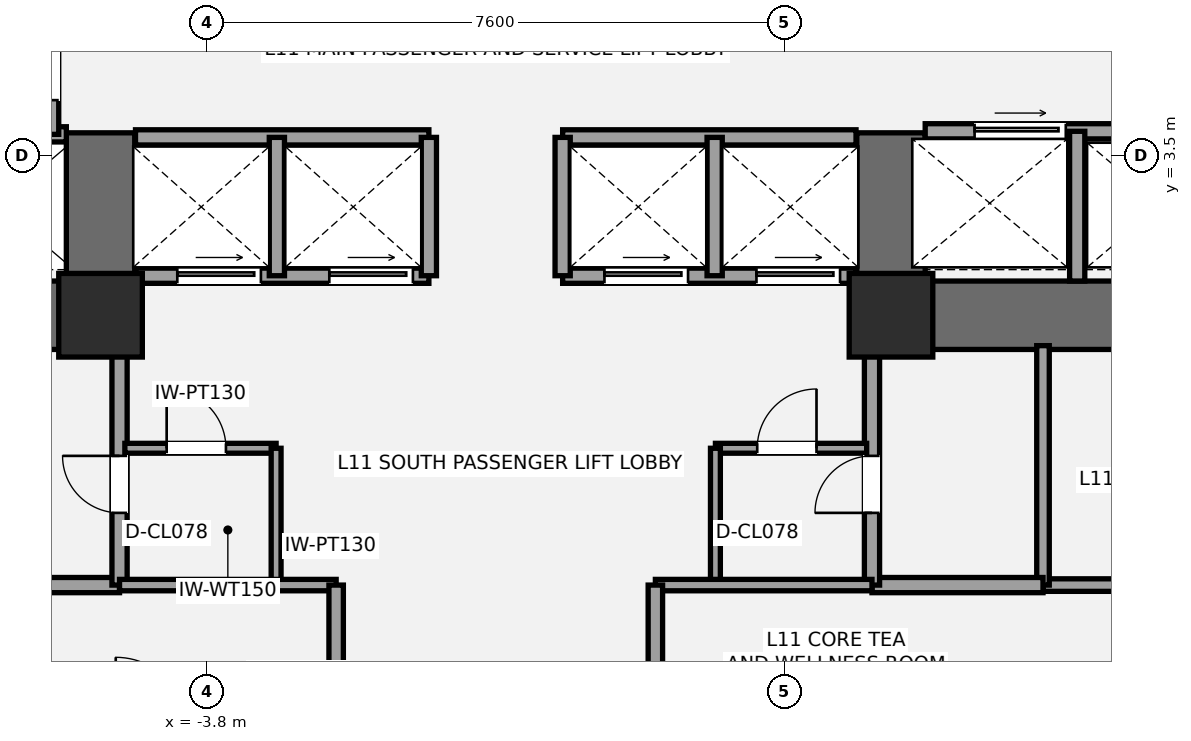
"""IFC4 building model, lengths in metres.
Left out: names, types, materials, properties, quantities, classifications, styles, units other than length and angle.
Written with IfcOpenShell. Run it as: python <this file> out.ifc"""

import sys

from ifc_helpers import new_model, si_unit, direction, frame, frame_2d, origin, origin_2d, place, context, subcontext, project, spatial, rectangle, extrude, element, fill, save


model = new_model("IFC4")
c1 = context("Model", 3, precision=1e-05, world=origin(), true_north=direction((0.0, 1.0)))
c2 = subcontext(c1, "Body", "Model", "MODEL_VIEW")
j1 = project(units=[si_unit("LENGTHUNIT", "METRE"), si_unit("PLANEANGLEUNIT", "RADIAN")], contexts=[c1])
p1 = place(None, origin())
s1 = spatial("IfcSite", under=j1, at=p1, CompositionType="ELEMENT")
p2 = place(p1, origin())
s2 = spatial("IfcBuilding", under=s1, at=p2, CompositionType="ELEMENT")
p3 = place(p2, frame((0.0, 0.0, 45.0)))
s3 = spatial("IfcBuildingStorey", under=s2, at=p3, CompositionType="ELEMENT", Elevation=45.0)
p4 = place(p3, frame((-4.75, 1.4, 0.0), z_axis=(0.0, 0.0, 1.0), x_axis=(-1.0, 0.0, 0.0)))
e1 = element("IfcWall", 1, at=p4, inside=s3, PredefinedType="SHEAR", context=c2, shape_type="SweptSolid", body=[
    extrude(rectangle(XDim=9.3, YDim=0.9, at=frame_2d((4.65, 0.0))), origin(), (0.0, 0.0, 1.0), 3.6),
])
p5 = place(p4, frame((5.55, 0.0, 0.0)))
e2 = element("IfcOpeningElement", 2, at=p5, cuts=e1, PredefinedType="OPENING", context=c2, shape_type="SweptSolid", body=[
    extrude(rectangle(XDim=1.05, YDim=2.15, at=frame_2d((0.525, 1.075))), frame((0.0, 0.46, 0.0), z_axis=(0.0, -1.0, 0.0), x_axis=(1.0, 0.0, 0.0)), (0.0, 0.0, 1.0), 0.92),
])
p6 = place(p4, frame((3.88, 0.0, 0.0)))
e3 = element("IfcOpeningElement", 3, at=p6, cuts=e1, PredefinedType="OPENING", context=c2, shape_type="SweptSolid", body=[
    extrude(rectangle(XDim=1.1, YDim=2.2, at=frame_2d((0.55, 1.1))), frame((0.0, 0.46, 0.0), z_axis=(0.0, -1.0, 0.0), x_axis=(1.0, 0.0, 0.0)), (0.0, 0.0, 1.0), 0.92),
])
p7 = place(p3, frame((-5.2, 0.95, 0.0), z_axis=(0.0, 0.0, 1.0), x_axis=(0.0, 1.0, 0.0)))
e4 = element("IfcWall", 4, at=p7, inside=s3, PredefinedType="SHEAR", context=c2, shape_type="SweptSolid", body=[
    extrude(rectangle(XDim=2.85, YDim=0.9, at=frame_2d((1.425, 0.0))), origin(), (0.0, 0.0, 1.0), 3.6),
])
p8 = place(p3, frame((14.05, 1.4, 0.0), z_axis=(0.0, 0.0, 1.0), x_axis=(-1.0, 0.0, 0.0)))
e5 = element("IfcWall", 5, at=p8, inside=s3, PredefinedType="SHEAR", context=c2, shape_type="SweptSolid", body=[
    extrude(rectangle(XDim=9.3, YDim=0.9, at=frame_2d((4.65, 0.0))), origin(), (0.0, 0.0, 1.0), 3.6),
])
p9 = place(p8, frame((2.7, 0.0, 0.0)))
e6 = element("IfcOpeningElement", 6, at=p9, cuts=e5, PredefinedType="OPENING", context=c2, shape_type="SweptSolid", body=[
    extrude(rectangle(XDim=1.05, YDim=2.15, at=frame_2d((0.525, 1.075))), frame((0.0, 0.46, 0.0), z_axis=(0.0, -1.0, 0.0), x_axis=(1.0, 0.0, 0.0)), (0.0, 0.0, 1.0), 0.92),
])
p10 = place(p8, frame((4.7, 0.0, 0.0)))
e7 = element("IfcOpeningElement", 7, at=p10, cuts=e5, PredefinedType="OPENING", context=c2, shape_type="SweptSolid", body=[
    extrude(rectangle(XDim=1.1, YDim=2.2, at=frame_2d((0.55, 1.1))), frame((0.0, 0.46, 0.0), z_axis=(0.0, -1.0, 0.0), x_axis=(1.0, 0.0, 0.0)), (0.0, 0.0, 1.0), 0.92),
])
p11 = place(p3, frame((5.2, 0.95, 0.0), z_axis=(0.0, 0.0, 1.0), x_axis=(0.0, 1.0, 0.0)))
e8 = element("IfcWall", 8, at=p11, inside=s3, PredefinedType="SHEAR", context=c2, shape_type="SweptSolid", body=[
    extrude(rectangle(XDim=2.85, YDim=0.9, at=frame_2d((1.425, 0.0))), origin(), (0.0, 0.0, 1.0), 3.6),
])
for number, where, z_axis, x_axis in (
    (9, (-5.2, 1.4, 0.0), (0.0, 0.0, 1.0), (1.0, 0.0, 0.0)),
    (10, (5.2, 1.4, 0.0), (0.0, 0.0, 1.0), (1.0, 0.0, 0.0)),
):
    element("IfcColumn", number, at=place(p3, frame(where, z_axis=z_axis, x_axis=x_axis)), inside=s3, PredefinedType="COLUMN", context=c2, shape_type="SweptSolid", body=[
        extrude(rectangle(XDim=1.1, YDim=1.1, at=origin_2d()), origin(), (0.0, 0.0, 1.0), 3.6),
    ])
p12 = place(p3, frame((-7.2, -2.15, 0.0), z_axis=(0.0, 0.0, 1.0), x_axis=(1.0, 0.0, 0.0)))
e11 = element("IfcWall", 11, at=p12, inside=s3, PredefinedType="SOLIDWALL", context=c2, shape_type="SweptSolid", body=[
    extrude(rectangle(XDim=2.25, YDim=0.2, at=frame_2d((1.125, 0.0))), origin(), (0.0, 0.0, 1.0), 3.4),
])
p13 = place(p3, frame((-4.95, -2.15, 0.0), z_axis=(0.0, 0.0, 1.0), x_axis=(0.0, 1.0, 0.0)))
e12 = element("IfcWall", 12, at=p13, inside=s3, PredefinedType="SOLIDWALL", context=c2, shape_type="SweptSolid", body=[
    extrude(rectangle(XDim=3.15, YDim=0.2, at=frame_2d((1.575, 0.0))), origin(), (0.0, 0.0, 1.0), 2.853),
])
p14 = place(p13, frame((0.95, 0.0, 0.0)))
e13 = element("IfcOpeningElement", 13, at=p14, cuts=e12, PredefinedType="OPENING", context=c2, shape_type="SweptSolid", body=[
    extrude(rectangle(XDim=0.75, YDim=2.1, at=frame_2d((0.375, 1.05))), frame((0.0, 0.11, 0.0), z_axis=(0.0, -1.0, 0.0), x_axis=(1.0, 0.0, 0.0)), (0.0, 0.0, 1.0), 0.22),
])
p15 = place(p3, frame((7.2, -2.15, 0.0), z_axis=(0.0, 0.0, 1.0), x_axis=(1.0, 0.0, 0.0)))
e14 = element("IfcWall", 14, at=p15, inside=s3, PredefinedType="PARTITIONING", context=c2, shape_type="SweptSolid", body=[
    extrude(rectangle(XDim=6.25, YDim=0.165, at=frame_2d((3.125, 0.0))), origin(), (0.0, 0.0, 1.0), 3.4),
])
p16 = place(p3, frame((7.2, -2.15, 0.0), z_axis=(0.0, 0.0, 1.0), x_axis=(0.0, 1.0, 0.0)))
e15 = element("IfcWall", 15, at=p16, inside=s3, PredefinedType="PARTITIONING", context=c2, shape_type="SweptSolid", body=[
    extrude(rectangle(XDim=3.15, YDim=0.165, at=frame_2d((1.575, 0.0))), origin(), (0.0, 0.0, 1.0), 2.853),
])
p17 = place(p3, frame((4.95, -2.15, 0.0), z_axis=(0.0, 0.0, 1.0), x_axis=(1.0, 0.0, 0.0)))
e16 = element("IfcWall", 16, at=p17, inside=s3, PredefinedType="SOLIDWALL", context=c2, shape_type="SweptSolid", body=[
    extrude(rectangle(XDim=2.25, YDim=0.2, at=frame_2d((1.125, 0.0))), origin(), (0.0, 0.0, 1.0), 3.4),
])
p18 = place(p3, frame((4.95, -2.15, 0.0), z_axis=(0.0, 0.0, 1.0), x_axis=(0.0, 1.0, 0.0)))
e17 = element("IfcWall", 17, at=p18, inside=s3, PredefinedType="SOLIDWALL", context=c2, shape_type="SweptSolid", body=[
    extrude(rectangle(XDim=3.15, YDim=0.2, at=frame_2d((1.575, 0.0))), origin(), (0.0, 0.0, 1.0), 3.4),
])
p19 = place(p18, frame((0.95, 0.0, 0.0)))
e18 = element("IfcOpeningElement", 18, at=p19, cuts=e17, PredefinedType="OPENING", context=c2, shape_type="SweptSolid", body=[
    extrude(rectangle(XDim=0.75, YDim=2.1, at=frame_2d((0.375, 1.05))), frame((0.0, 0.11, 0.0), z_axis=(0.0, -1.0, 0.0), x_axis=(1.0, 0.0, 0.0)), (0.0, 0.0, 1.0), 0.22),
])
p20 = place(p3, frame((-4.88, -0.35, 0.0), z_axis=(0.0, 0.0, 1.0), x_axis=(1.0, 0.0, 0.0)))
e19 = element("IfcWall", 19, at=p20, inside=s3, PredefinedType="PARTITIONING", context=c2, shape_type="SweptSolid", body=[
    extrude(rectangle(XDim=1.99, YDim=0.13, at=frame_2d((0.995, 0.0))), origin(), (0.0, 0.0, 1.0), 3.4),
])
p21 = place(p20, frame((0.55, 0.0, 0.0)))
e20 = element("IfcOpeningElement", 20, at=p21, cuts=e19, PredefinedType="OPENING", context=c2, shape_type="SweptSolid", body=[
    extrude(rectangle(XDim=0.78, YDim=2.1, at=frame_2d((0.39, 1.05))), frame((0.0, 0.075, 0.0), z_axis=(0.0, -1.0, 0.0), x_axis=(1.0, 0.0, 0.0)), (0.0, 0.0, 1.0), 0.15),
])
p22 = place(p3, frame((-2.89, -2.15, 0.0), z_axis=(0.0, 0.0, 1.0), x_axis=(0.0, 1.0, 0.0)))
e21 = element("IfcWall", 21, at=p22, inside=s3, PredefinedType="PARTITIONING", context=c2, shape_type="SweptSolid", body=[
    extrude(rectangle(XDim=1.8, YDim=0.13, at=frame_2d((0.9, 0.0))), origin(), (0.0, 0.0, 1.0), 3.4),
])
p23 = place(p3, frame((2.89, -0.35, 0.0), z_axis=(0.0, 0.0, 1.0), x_axis=(1.0, 0.0, 0.0)))
e22 = element("IfcWall", 22, at=p23, inside=s3, PredefinedType="PARTITIONING", context=c2, shape_type="SweptSolid", body=[
    extrude(rectangle(XDim=1.99, YDim=0.13, at=frame_2d((0.995, 0.0))), origin(), (0.0, 0.0, 1.0), 3.4),
])
p24 = place(p23, frame((0.55, 0.0, 0.0)))
e23 = element("IfcOpeningElement", 23, at=p24, cuts=e22, PredefinedType="OPENING", context=c2, shape_type="SweptSolid", body=[
    extrude(rectangle(XDim=0.78, YDim=2.1, at=frame_2d((0.39, 1.05))), frame((0.0, 0.075, 0.0), z_axis=(0.0, -1.0, 0.0), x_axis=(1.0, 0.0, 0.0)), (0.0, 0.0, 1.0), 0.15),
])
p25 = place(p3, frame((2.89, -2.15, 0.0), z_axis=(0.0, 0.0, 1.0), x_axis=(0.0, 1.0, 0.0)))
e24 = element("IfcWall", 24, at=p25, inside=s3, PredefinedType="PARTITIONING", context=c2, shape_type="SweptSolid", body=[
    extrude(rectangle(XDim=1.8, YDim=0.13, at=frame_2d((0.9, 0.0))), origin(), (0.0, 0.0, 1.0), 3.4),
])
p26 = place(p3, frame((-9.78, 3.78, 0.0), z_axis=(0.0, 0.0, 1.0), x_axis=(1.0, 0.0, 0.0)))
e25 = element("IfcWall", 25, at=p26, inside=s3, PredefinedType="SOLIDWALL", context=c2, shape_type="SweptSolid", body=[
    extrude(rectangle(XDim=4.13, YDim=0.2, at=frame_2d((2.065, 0.0))), origin(), (0.0, 0.0, 1.0), 3.4),
])
p27 = place(p3, frame((-5.85, 3.78, 0.0), z_axis=(0.0, 0.0, 1.0), x_axis=(0.0, 1.0, 0.0)))
e26 = element("IfcWall", 26, at=p27, inside=s3, PredefinedType="SOLIDWALL", context=c2, shape_type="SweptSolid", body=[
    extrude(rectangle(XDim=1.69, YDim=0.2, at=frame_2d((0.845, 0.0))), origin(), (0.0, 0.0, 1.0), 3.4),
])
p28 = place(p27, frame((0.45, 0.0, 0.0)))
e27 = element("IfcOpeningElement", 27, at=p28, cuts=e26, PredefinedType="OPENING", context=c2, shape_type="SweptSolid", body=[
    extrude(rectangle(XDim=0.75, YDim=2.1, at=frame_2d((0.375, 1.05))), frame((0.0, 0.11, 0.0), z_axis=(0.0, -1.0, 0.0), x_axis=(1.0, 0.0, 0.0)), (0.0, 0.0, 1.0), 0.22),
])
p29 = place(p3, frame((5.65, 3.82, 0.0), z_axis=(0.0, 0.0, 1.0), x_axis=(1.0, 0.0, 0.0)))
e28 = element("IfcWall", 28, at=p29, inside=s3, PredefinedType="SOLIDWALL", context=c2, shape_type="SweptSolid", body=[
    extrude(rectangle(XDim=4.13, YDim=0.2, at=frame_2d((2.065, 0.0))), origin(), (0.0, 0.0, 1.0), 3.4),
])
p30 = place(p29, frame((0.65, 0.0, 0.0)))
e29 = element("IfcOpeningElement", 29, at=p30, cuts=e28, PredefinedType="OPENING", context=c2, shape_type="SweptSolid", body=[
    extrude(rectangle(XDim=1.2, YDim=2.2, at=frame_2d((0.6, 1.1))), frame((0.0, 0.11, 0.0), z_axis=(0.0, -1.0, 0.0), x_axis=(1.0, 0.0, 0.0)), (0.0, 0.0, 1.0), 0.22),
])
p31 = place(p3, frame((7.65, 1.85, 0.0), z_axis=(0.0, 0.0, 1.0), x_axis=(0.0, 1.0, 0.0)))
e30 = element("IfcWall", 30, at=p31, inside=s3, PredefinedType="SOLIDWALL", context=c2, shape_type="SweptSolid", body=[
    extrude(rectangle(XDim=1.97, YDim=0.2, at=frame_2d((0.985, 0.0))), origin(), (0.0, 0.0, 1.0), 3.4),
])
p32 = place(p3, frame((-4.74, 1.92, 0.0), z_axis=(0.0, 0.0, 1.0), x_axis=(1.0, 0.0, 0.0)))
e31 = element("IfcWall", 31, at=p32, inside=s3, PredefinedType="SOLIDWALL", context=c2, shape_type="SweptSolid", body=[
    extrude(rectangle(XDim=3.86, YDim=0.2, at=frame_2d((1.93, 0.0))), origin(), (0.0, 0.0, 1.0), 2.39),
])
p33 = place(p32, frame((0.55, 0.0, 0.0)))
e32 = element("IfcOpeningElement", 32, at=p33, cuts=e31, PredefinedType="OPENING", context=c2, shape_type="SweptSolid", body=[
    extrude(rectangle(XDim=1.1, YDim=2.2, at=frame_2d((0.55, 1.1))), frame((0.0, 0.11, 0.0), z_axis=(0.0, -1.0, 0.0), x_axis=(1.0, 0.0, 0.0)), (0.0, 0.0, 1.0), 0.22),
])
p34 = place(p32, frame((2.55, 0.0, 0.0)))
e33 = element("IfcOpeningElement", 33, at=p34, cuts=e31, PredefinedType="OPENING", context=c2, shape_type="SweptSolid", body=[
    extrude(rectangle(XDim=1.1, YDim=2.2, at=frame_2d((0.55, 1.1))), frame((0.0, 0.11, 0.0), z_axis=(0.0, -1.0, 0.0), x_axis=(1.0, 0.0, 0.0)), (0.0, 0.0, 1.0), 0.22),
])
p35 = place(p3, frame((0.88, 1.92, 0.0), z_axis=(0.0, 0.0, 1.0), x_axis=(1.0, 0.0, 0.0)))
e34 = element("IfcWall", 34, at=p35, inside=s3, PredefinedType="SOLIDWALL", context=c2, shape_type="SweptSolid", body=[
    extrude(rectangle(XDim=3.86, YDim=0.2, at=frame_2d((1.93, 0.0))), origin(), (0.0, 0.0, 1.0), 2.39),
])
p36 = place(p35, frame((0.55, 0.0, 0.0)))
e35 = element("IfcOpeningElement", 35, at=p36, cuts=e34, PredefinedType="OPENING", context=c2, shape_type="SweptSolid", body=[
    extrude(rectangle(XDim=1.1, YDim=2.2, at=frame_2d((0.55, 1.1))), frame((0.0, 0.11, 0.0), z_axis=(0.0, -1.0, 0.0), x_axis=(1.0, 0.0, 0.0)), (0.0, 0.0, 1.0), 0.22),
])
p37 = place(p35, frame((2.55, 0.0, 0.0)))
e36 = element("IfcOpeningElement", 36, at=p37, cuts=e34, PredefinedType="OPENING", context=c2, shape_type="SweptSolid", body=[
    extrude(rectangle(XDim=1.1, YDim=2.2, at=frame_2d((0.55, 1.1))), frame((0.0, 0.11, 0.0), z_axis=(0.0, -1.0, 0.0), x_axis=(1.0, 0.0, 0.0)), (0.0, 0.0, 1.0), 0.22),
])
for number, where, z_axis, x_axis in (
    (37, (-4.74, 3.74, 0.0), (0.0, 0.0, 1.0), (1.0, 0.0, 0.0)),
    (38, (0.88, 3.74, 0.0), (0.0, 0.0, 1.0), (1.0, 0.0, 0.0)),
):
    element("IfcWall", number, at=place(p3, frame(where, z_axis=z_axis, x_axis=x_axis)), inside=s3, PredefinedType="SOLIDWALL", context=c2, shape_type="SweptSolid", body=[
        extrude(rectangle(XDim=3.86, YDim=0.2, at=frame_2d((1.93, 0.0))), origin(), (0.0, 0.0, 1.0), 3.4),
    ])
for number, where, z_axis, x_axis in (
    (39, (-2.88, 1.92, 0.0), (0.0, 0.0, 1.0), (0.0, 1.0, 0.0)),
    (40, (2.88, 1.92, 0.0), (0.0, 0.0, 1.0), (0.0, 1.0, 0.0)),
    (41, (-0.88, 1.92, 0.0), (0.0, 0.0, 1.0), (0.0, 1.0, 0.0)),
    (42, (0.88, 1.92, 0.0), (0.0, 0.0, 1.0), (0.0, 1.0, 0.0)),
):
    element("IfcWall", number, at=place(p3, frame(where, z_axis=z_axis, x_axis=x_axis)), inside=s3, PredefinedType="SOLIDWALL", context=c2, shape_type="SweptSolid", body=[
        extrude(rectangle(XDim=1.82, YDim=0.2, at=frame_2d((0.91, 0.0))), origin(), (0.0, 0.0, 1.0), 3.4),
    ])
p38 = place(p3, frame((-4.95, -2.15, 0.0), z_axis=(0.0, 0.0, 1.0), x_axis=(1.0, 0.0, 0.0)))
e43 = element("IfcWall", 43, at=p38, inside=s3, PredefinedType="PLUMBINGWALL", context=c2, shape_type="SweptSolid", body=[
    extrude(rectangle(XDim=2.85, YDim=0.15, at=frame_2d((1.425, 0.0))), origin(), (0.0, 0.0, 1.0), 2.853),
])
p39 = place(p3, frame((-2.1, -4.05, 0.0), z_axis=(0.0, 0.0, 1.0), x_axis=(0.0, 1.0, 0.0)))
e44 = element("IfcWall", 44, at=p39, inside=s3, PredefinedType="PLUMBINGWALL", context=c2, shape_type="SweptSolid", body=[
    extrude(rectangle(XDim=1.9, YDim=0.19, at=frame_2d((0.95, 0.0))), origin(), (0.0, 0.0, 1.0), 3.4),
])
p40 = place(p3, frame((2.1, -2.15, 0.0), z_axis=(0.0, 0.0, 1.0), x_axis=(1.0, 0.0, 0.0)))
e45 = element("IfcWall", 45, at=p40, inside=s3, PredefinedType="PLUMBINGWALL", context=c2, shape_type="SweptSolid", body=[
    extrude(rectangle(XDim=2.85, YDim=0.15, at=frame_2d((1.425, 0.0))), origin(), (0.0, 0.0, 1.0), 3.4),
])
p41 = place(p3, frame((2.1, -4.05, 0.0), z_axis=(0.0, 0.0, 1.0), x_axis=(0.0, 1.0, 0.0)))
e46 = element("IfcWall", 46, at=p41, inside=s3, PredefinedType="PLUMBINGWALL", context=c2, shape_type="SweptSolid", body=[
    extrude(rectangle(XDim=1.9, YDim=0.19, at=frame_2d((0.95, 0.0))), origin(), (0.0, 0.0, 1.0), 3.4),
])
p42 = place(p14, origin())
e47 = element("IfcDoor", 47, at=p42, inside=s3, OperationType="SINGLE_SWING_RIGHT", PredefinedType="DOOR", context=c2, shape_type="SweptSolid", body=[
    extrude(rectangle(XDim=0.75, YDim=2.1, at=frame_2d((0.375, 1.05))), frame((0.0, 0.025, 0.0), z_axis=(0.0, -1.0, 0.0), x_axis=(1.0, 0.0, 0.0)), (0.0, 0.0, 1.0), 0.05),
])
fill(e13, e47)
p43 = place(p19, origin())
e48 = element("IfcDoor", 48, at=p43, inside=s3, OperationType="SINGLE_SWING_LEFT", PredefinedType="DOOR", context=c2, shape_type="SweptSolid", body=[
    extrude(rectangle(XDim=0.75, YDim=2.1, at=frame_2d((0.375, 1.05))), frame((0.0, 0.025, 0.0), z_axis=(0.0, -1.0, 0.0), x_axis=(1.0, 0.0, 0.0)), (0.0, 0.0, 1.0), 0.05),
])
fill(e18, e48)
p44 = place(p21, origin())
e49 = element("IfcDoor", 49, at=p44, inside=s3, OperationType="SINGLE_SWING_LEFT", PredefinedType="DOOR", context=c2, shape_type="SweptSolid", body=[
    extrude(rectangle(XDim=0.78, YDim=2.1, at=frame_2d((0.39, 1.05))), frame((0.0, 0.025, 0.0), z_axis=(0.0, -1.0, 0.0), x_axis=(1.0, 0.0, 0.0)), (0.0, 0.0, 1.0), 0.05),
])
fill(e20, e49)
p45 = place(p24, origin())
e50 = element("IfcDoor", 50, at=p45, inside=s3, OperationType="SINGLE_SWING_RIGHT", PredefinedType="DOOR", context=c2, shape_type="SweptSolid", body=[
    extrude(rectangle(XDim=0.78, YDim=2.1, at=frame_2d((0.39, 1.05))), frame((0.0, 0.025, 0.0), z_axis=(0.0, -1.0, 0.0), x_axis=(1.0, 0.0, 0.0)), (0.0, 0.0, 1.0), 0.05),
])
fill(e23, e50)
p46 = place(p28, origin())
e51 = element("IfcDoor", 51, at=p46, inside=s3, OperationType="SINGLE_SWING_RIGHT", PredefinedType="DOOR", context=c2, shape_type="SweptSolid", body=[
    extrude(rectangle(XDim=0.75, YDim=2.1, at=frame_2d((0.375, 1.05))), frame((0.0, 0.025, 0.0), z_axis=(0.0, -1.0, 0.0), x_axis=(1.0, 0.0, 0.0)), (0.0, 0.0, 1.0), 0.05),
])
fill(e27, e51)
p47 = place(p30, origin())
e52 = element("IfcDoor", 52, at=p47, inside=s3, OperationType="SLIDING_TO_RIGHT", PredefinedType="DOOR", context=c2, shape_type="SweptSolid", body=[
    extrude(rectangle(XDim=1.2, YDim=2.2, at=frame_2d((0.6, 1.1))), frame((0.0, 0.025, 0.0), z_axis=(0.0, -1.0, 0.0), x_axis=(1.0, 0.0, 0.0)), (0.0, 0.0, 1.0), 0.05),
])
fill(e29, e52)
p48 = place(p33, origin())
e53 = element("IfcDoor", 53, at=p48, inside=s3, OperationType="SLIDING_TO_LEFT", PredefinedType="DOOR", context=c2, shape_type="SweptSolid", body=[
    extrude(rectangle(XDim=1.1, YDim=2.2, at=frame_2d((0.55, 1.1))), frame((0.0, 0.025, 0.0), z_axis=(0.0, -1.0, 0.0), x_axis=(1.0, 0.0, 0.0)), (0.0, 0.0, 1.0), 0.05),
])
fill(e32, e53)
p49 = place(p34, origin())
e54 = element("IfcDoor", 54, at=p49, inside=s3, OperationType="SLIDING_TO_LEFT", PredefinedType="DOOR", context=c2, shape_type="SweptSolid", body=[
    extrude(rectangle(XDim=1.1, YDim=2.2, at=frame_2d((0.55, 1.1))), frame((0.0, 0.025, 0.0), z_axis=(0.0, -1.0, 0.0), x_axis=(1.0, 0.0, 0.0)), (0.0, 0.0, 1.0), 0.05),
])
fill(e33, e54)
p50 = place(p36, origin())
e55 = element("IfcDoor", 55, at=p50, inside=s3, OperationType="SLIDING_TO_LEFT", PredefinedType="DOOR", context=c2, shape_type="SweptSolid", body=[
    extrude(rectangle(XDim=1.1, YDim=2.2, at=frame_2d((0.55, 1.1))), frame((0.0, 0.025, 0.0), z_axis=(0.0, -1.0, 0.0), x_axis=(1.0, 0.0, 0.0)), (0.0, 0.0, 1.0), 0.05),
])
fill(e35, e55)
p51 = place(p37, origin())
e56 = element("IfcDoor", 56, at=p51, inside=s3, OperationType="SLIDING_TO_LEFT", PredefinedType="DOOR", context=c2, shape_type="SweptSolid", body=[
    extrude(rectangle(XDim=1.1, YDim=2.2, at=frame_2d((0.55, 1.1))), frame((0.0, 0.025, 0.0), z_axis=(0.0, -1.0, 0.0), x_axis=(1.0, 0.0, 0.0)), (0.0, 0.0, 1.0), 0.05),
])
fill(e36, e56)
save(model, sys.argv[1])
